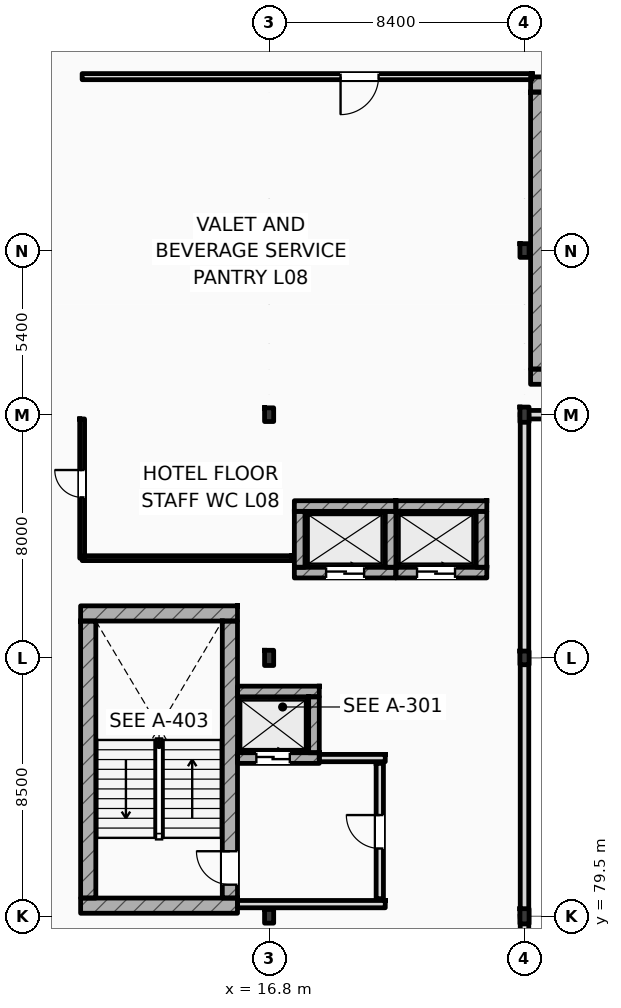
"""IFC4 building model, lengths in metres.
Left out: names, types, materials, properties, quantities, classifications, styles, units other than length and angle.
Written with IfcOpenShell. Run it as: python <this file> out.ifc"""

import sys

from ifc_helpers import new_model, si_unit, direction, frame, frame_2d, origin, origin_2d, place, context, subcontext, project, spatial, rectangle, i_section, extrude, element, fill, save


model = new_model("IFC4")
c1 = context("Model", 3, precision=1e-05, world=origin(), true_north=direction((0.0, 1.0)))
c2 = subcontext(c1, "Body", "Model", "MODEL_VIEW")
j1 = project(units=[si_unit("LENGTHUNIT", "METRE"), si_unit("PLANEANGLEUNIT", "RADIAN")], contexts=[c1])
p1 = place(None, origin())
s1 = spatial("IfcSite", under=j1, at=p1, CompositionType="ELEMENT")
p2 = place(p1, origin())
s2 = spatial("IfcBuilding", under=s1, at=p2, CompositionType="ELEMENT")
p3 = place(p2, frame((0.0, 0.0, 35.4)))
s3 = spatial("IfcBuildingStorey", under=s2, at=p3, CompositionType="ELEMENT", Elevation=35.4)
p4 = place(p3, frame((16.8, 79.5, 0.0), z_axis=(0.0, 0.0, 1.0), x_axis=(1.0, 0.0, 0.0)))
e1 = element("IfcColumn", 1, at=p4, inside=s3, PredefinedType="COLUMN", context=c2, shape_type="SweptSolid", body=[
    extrude(i_section(OverallWidth=0.3, OverallDepth=0.45, WebThickness=0.014, FlangeThickness=0.026, FilletRadius=0.027, at=origin_2d()), origin(), (0.0, 0.0, 1.0), 3.6),
])
p5 = place(p3, frame((16.8, 88.0, 0.0), z_axis=(0.0, 0.0, 1.0), x_axis=(1.0, 0.0, 0.0)))
e2 = element("IfcColumn", 2, at=p5, inside=s3, PredefinedType="COLUMN", context=c2, shape_type="SweptSolid", body=[
    extrude(i_section(OverallWidth=0.3, OverallDepth=0.5, WebThickness=0.014, FlangeThickness=0.028, FilletRadius=0.027, at=origin_2d()), origin(), (0.0, 0.0, 1.0), 3.6),
])
p6 = place(p3, frame((16.8, 96.0, 0.0), z_axis=(0.0, 0.0, 1.0), x_axis=(1.0, 0.0, 0.0)))
e3 = element("IfcColumn", 3, at=p6, inside=s3, PredefinedType="COLUMN", context=c2, shape_type="SweptSolid", body=[
    extrude(i_section(OverallWidth=0.3, OverallDepth=0.45, WebThickness=0.014, FlangeThickness=0.026, FilletRadius=0.027, at=origin_2d()), origin(), (0.0, 0.0, 1.0), 3.6),
])
p7 = place(p3, frame((25.2, 79.5, 0.0), z_axis=(0.0, 0.0, 1.0), x_axis=(1.0, 0.0, 0.0)))
e4 = element("IfcColumn", 4, at=p7, inside=s3, PredefinedType="COLUMN", context=c2, shape_type="SweptSolid", body=[
    extrude(i_section(OverallWidth=0.3, OverallDepth=0.5, WebThickness=0.014, FlangeThickness=0.028, FilletRadius=0.027, at=origin_2d()), origin(), (0.0, 0.0, 1.0), 3.6),
])
p8 = place(p3, frame((25.2, 88.0, 0.0), z_axis=(0.0, 0.0, 1.0), x_axis=(1.0, 0.0, 0.0)))
e5 = element("IfcColumn", 5, at=p8, inside=s3, PredefinedType="COLUMN", context=c2, shape_type="SweptSolid", body=[
    extrude(i_section(OverallWidth=0.3, OverallDepth=0.45, WebThickness=0.014, FlangeThickness=0.026, FilletRadius=0.027, at=origin_2d()), origin(), (0.0, 0.0, 1.0), 3.6),
])
p9 = place(p3, frame((25.2, 96.0, 0.0), z_axis=(0.0, 0.0, 1.0), x_axis=(1.0, 0.0, 0.0)))
e6 = element("IfcColumn", 6, at=p9, inside=s3, PredefinedType="COLUMN", context=c2, shape_type="SweptSolid", body=[
    extrude(i_section(OverallWidth=0.3, OverallDepth=0.5, WebThickness=0.014, FlangeThickness=0.028, FilletRadius=0.027, at=origin_2d()), origin(), (0.0, 0.0, 1.0), 3.6),
])
for number, where, z_axis, x_axis in (
    (7, (16.8, 101.4, 0.0), (0.0, 0.0, 1.0), (1.0, 0.0, 0.0)),
    (8, (25.2, 101.4, 0.0), (0.0, 0.0, 1.0), (1.0, 0.0, 0.0)),
):
    element("IfcColumn", number, at=place(p3, frame(where, z_axis=z_axis, x_axis=x_axis)), inside=s3, PredefinedType="COLUMN", context=c2, shape_type="SweptSolid", body=[
        extrude(i_section(OverallWidth=0.3, OverallDepth=0.45, WebThickness=0.014, FlangeThickness=0.026, FilletRadius=0.027, at=origin_2d()), origin(), (0.0, 0.0, 1.0), 3.6),
    ])
for number, where, z_axis, x_axis in (
    (9, (10.6, 89.462, 0.0), (0.0, 0.0, 1.0), (1.0, 0.0, 0.0)),
    (10, (10.6, 79.85, 0.0), (0.0, 0.0, 1.0), (1.0, 0.0, 0.0)),
):
    element("IfcWall", number, at=place(p3, frame(where, z_axis=z_axis, x_axis=x_axis)), inside=s3, PredefinedType="SHEAR", context=c2, shape_type="SweptSolid", body=[
        extrude(rectangle(XDim=5.16, YDim=0.5, at=frame_2d((2.58, 0.0))), origin(), (0.0, 0.0, 1.0), 3.6),
    ])
p10 = place(p3, frame((10.85, 80.1, 0.0), z_axis=(0.0, 0.0, 1.0), x_axis=(0.0, 1.0, 0.0)))
e11 = element("IfcWall", 11, at=p10, inside=s3, PredefinedType="SHEAR", context=c2, shape_type="SweptSolid", body=[
    extrude(rectangle(XDim=9.112, YDim=0.5, at=frame_2d((4.556, 0.0))), origin(), (0.0, 0.0, 1.0), 3.6),
])
p11 = place(p3, frame((15.51, 80.1, 0.0), z_axis=(0.0, 0.0, 1.0), x_axis=(0.0, 1.0, 0.0)))
e12 = element("IfcWall", 12, at=p11, inside=s3, PredefinedType="SHEAR", context=c2, shape_type="SweptSolid", body=[
    extrude(rectangle(XDim=9.112, YDim=0.5, at=frame_2d((4.556, 0.0))), origin(), (0.0, 0.0, 1.0), 3.6),
])
p12 = place(p11, frame((0.44, 0.0, 0.0)))
e13 = element("IfcOpeningElement", 13, at=p12, cuts=e12, PredefinedType="OPENING", context=c2, shape_type="SweptSolid", body=[
    extrude(rectangle(XDim=1.1, YDim=2.2, at=frame_2d((0.55, 1.1))), frame((0.0, 0.26, 0.0), z_axis=(0.0, -1.0, 0.0), x_axis=(1.0, 0.0, 0.0)), (0.0, 0.0, 1.0), 0.52),
])
for number, where, z_axis, x_axis in (
    (14, (25.4, 106.862, 0.0), (0.0, 0.0, 1.0), (1.0, 0.0, 0.0)),
    (15, (25.4, 97.25, 0.0), (0.0, 0.0, 1.0), (1.0, 0.0, 0.0)),
):
    element("IfcWall", number, at=place(p3, frame(where, z_axis=z_axis, x_axis=x_axis)), inside=s3, PredefinedType="SHEAR", context=c2, shape_type="SweptSolid", body=[
        extrude(rectangle(XDim=5.16, YDim=0.5, at=frame_2d((2.58, 0.0))), origin(), (0.0, 0.0, 1.0), 3.6),
    ])
p13 = place(p3, frame((25.65, 97.5, 0.0), z_axis=(0.0, 0.0, 1.0), x_axis=(0.0, 1.0, 0.0)))
e16 = element("IfcWall", 16, at=p13, inside=s3, PredefinedType="SHEAR", context=c2, shape_type="SweptSolid", body=[
    extrude(rectangle(XDim=9.112, YDim=0.5, at=frame_2d((4.556, 0.0))), origin(), (0.0, 0.0, 1.0), 3.6),
])
p14 = place(p3, frame((25.2, 96.0, 0.0), z_axis=(0.0, 0.0, 1.0), x_axis=(1.0, 0.0, 0.0)))
e17 = element("IfcWall", 17, at=p14, inside=s3, PredefinedType="STANDARD", context=c2, shape_type="SweptSolid", body=[
    extrude(rectangle(XDim=70.2, YDim=0.28, at=frame_2d((35.1, 0.0))), origin(), (0.0, 0.0, 1.0), 2.92),
])
p15 = place(p14, frame((16.694, 0.0, 0.9)))
e18 = element("IfcOpeningElement", 18, at=p15, cuts=e17, PredefinedType="OPENING", context=c2, shape_type="SweptSolid", body=[
    extrude(rectangle(XDim=1.8, YDim=1.84, at=frame_2d((0.9, 0.92))), frame((0.0, 0.15, 0.0), z_axis=(0.0, -1.0, 0.0), x_axis=(1.0, 0.0, 0.0)), (0.0, 0.0, 1.0), 0.3),
])
p16 = place(p14, frame((20.482, 0.0, 0.9)))
e19 = element("IfcOpeningElement", 19, at=p16, cuts=e17, PredefinedType="OPENING", context=c2, shape_type="SweptSolid", body=[
    extrude(rectangle(XDim=1.95, YDim=1.84, at=frame_2d((0.975, 0.92))), frame((0.0, 0.15, 0.0), z_axis=(0.0, -1.0, 0.0), x_axis=(1.0, 0.0, 0.0)), (0.0, 0.0, 1.0), 0.3),
])
p17 = place(p14, frame((24.316, 0.0, 0.9)))
e20 = element("IfcOpeningElement", 20, at=p17, cuts=e17, PredefinedType="OPENING", context=c2, shape_type="SweptSolid", body=[
    extrude(rectangle(XDim=2.1, YDim=1.84, at=frame_2d((1.05, 0.92))), frame((0.0, 0.15, 0.0), z_axis=(0.0, -1.0, 0.0), x_axis=(1.0, 0.0, 0.0)), (0.0, 0.0, 1.0), 0.3),
])
p18 = place(p14, frame((28.149, 0.0, 0.9)))
e21 = element("IfcOpeningElement", 21, at=p18, cuts=e17, PredefinedType="OPENING", context=c2, shape_type="SweptSolid", body=[
    extrude(rectangle(XDim=2.25, YDim=1.84, at=frame_2d((1.125, 0.92))), frame((0.0, 0.15, 0.0), z_axis=(0.0, -1.0, 0.0), x_axis=(1.0, 0.0, 0.0)), (0.0, 0.0, 1.0), 0.3),
])
p19 = place(p14, frame((31.983, 0.0, 0.9)))
e22 = element("IfcOpeningElement", 22, at=p19, cuts=e17, PredefinedType="OPENING", context=c2, shape_type="SweptSolid", body=[
    extrude(rectangle(XDim=2.4, YDim=1.84, at=frame_2d((1.2, 0.92))), frame((0.0, 0.15, 0.0), z_axis=(0.0, -1.0, 0.0), x_axis=(1.0, 0.0, 0.0)), (0.0, 0.0, 1.0), 0.3),
])
p20 = place(p14, frame((35.682, 0.0, 0.9)))
e23 = element("IfcOpeningElement", 23, at=p20, cuts=e17, PredefinedType="OPENING", context=c2, shape_type="SweptSolid", body=[
    extrude(rectangle(XDim=2.508, YDim=1.84, at=frame_2d((1.254, 0.92))), frame((0.0, 0.15, 0.0), z_axis=(0.0, -1.0, 0.0), x_axis=(1.0, 0.0, 0.0)), (0.0, 0.0, 1.0), 0.3),
])
p21 = place(p14, frame((55.56, 0.0, 0.9)))
e24 = element("IfcOpeningElement", 24, at=p21, cuts=e17, PredefinedType="OPENING", context=c2, shape_type="SweptSolid", body=[
    extrude(rectangle(XDim=1.8, YDim=1.84, at=frame_2d((0.9, 0.92))), frame((0.0, 0.15, 0.0), z_axis=(0.0, -1.0, 0.0), x_axis=(1.0, 0.0, 0.0)), (0.0, 0.0, 1.0), 0.3),
])
p22 = place(p14, frame((58.628, 0.0, 0.9)))
e25 = element("IfcOpeningElement", 25, at=p22, cuts=e17, PredefinedType="OPENING", context=c2, shape_type="SweptSolid", body=[
    extrude(rectangle(XDim=2.809, YDim=1.84, at=frame_2d((1.405, 0.92))), frame((0.0, 0.15, 0.0), z_axis=(0.0, -1.0, 0.0), x_axis=(1.0, 0.0, 0.0)), (0.0, 0.0, 1.0), 0.3),
])
p23 = place(p14, frame((63.257, 0.0, 0.9)))
e26 = element("IfcOpeningElement", 26, at=p23, cuts=e17, PredefinedType="OPENING", context=c2, shape_type="SweptSolid", body=[
    extrude(rectangle(XDim=1.8, YDim=1.84, at=frame_2d((0.9, 0.92))), frame((0.0, 0.15, 0.0), z_axis=(0.0, -1.0, 0.0), x_axis=(1.0, 0.0, 0.0)), (0.0, 0.0, 1.0), 0.3),
])
p24 = place(p14, frame((66.453, 0.0, 0.9)))
e27 = element("IfcOpeningElement", 27, at=p24, cuts=e17, PredefinedType="OPENING", context=c2, shape_type="SweptSolid", body=[
    extrude(rectangle(XDim=2.737, YDim=1.84, at=frame_2d((1.369, 0.92))), frame((0.0, 0.15, 0.0), z_axis=(0.0, -1.0, 0.0), x_axis=(1.0, 0.0, 0.0)), (0.0, 0.0, 1.0), 0.3),
])
p25 = place(p3, frame((25.2, 62.5, 0.0), z_axis=(0.0, 0.0, 1.0), x_axis=(0.0, 1.0, 0.0)))
e28 = element("IfcWall", 28, at=p25, inside=s3, PredefinedType="STANDARD", context=c2, shape_type="SweptSolid", body=[
    extrude(rectangle(XDim=17.0, YDim=0.28, at=frame_2d((8.5, 0.0))), origin(), (0.0, 0.0, 1.0), 3.01),
])
p26 = place(p3, frame((25.2, 79.5, 0.0), z_axis=(0.0, 0.0, 1.0), x_axis=(0.0, 1.0, 0.0)))
e29 = element("IfcWall", 29, at=p26, inside=s3, PredefinedType="STANDARD", context=c2, shape_type="SweptSolid", body=[
    extrude(rectangle(XDim=16.5, YDim=0.28, at=frame_2d((8.25, 0.0))), origin(), (0.0, 0.0, 1.0), 3.01),
])
p27 = place(p3, frame((15.76, 86.895, 0.0), z_axis=(0.0, 0.0, 1.0), x_axis=(1.0, 0.0, 0.0)))
e30 = element("IfcWall", 30, at=p27, inside=s3, PredefinedType="SHEAR", context=c2, shape_type="SweptSolid", body=[
    extrude(rectangle(XDim=2.69, YDim=0.35, at=frame_2d((1.345, 0.0))), origin(), (0.0, 0.0, 1.0), 3.38),
])
p28 = place(p3, frame((15.76, 84.705, 0.0), z_axis=(0.0, 0.0, 1.0), x_axis=(1.0, 0.0, 0.0)))
e31 = element("IfcWall", 31, at=p28, inside=s3, PredefinedType="SHEAR", context=c2, shape_type="SweptSolid", body=[
    extrude(rectangle(XDim=2.69, YDim=0.35, at=frame_2d((1.345, 0.0))), origin(), (0.0, 0.0, 1.0), 3.38),
])
p29 = place(p28, frame((0.62, 0.0, 0.0)))
e32 = element("IfcOpeningElement", 32, at=p29, cuts=e31, PredefinedType="OPENING", context=c2, shape_type="SweptSolid", body=[
    extrude(rectangle(XDim=1.1, YDim=2.2, at=frame_2d((0.55, 1.1))), frame((0.0, 0.185, 0.0), z_axis=(0.0, -1.0, 0.0), x_axis=(1.0, 0.0, 0.0)), (0.0, 0.0, 1.0), 0.37),
])
p30 = place(p3, frame((18.275, 84.88, 0.0), z_axis=(0.0, 0.0, 1.0), x_axis=(0.0, 1.0, 0.0)))
e33 = element("IfcWall", 33, at=p30, inside=s3, PredefinedType="SHEAR", context=c2, shape_type="SweptSolid", body=[
    extrude(rectangle(XDim=1.84, YDim=0.35, at=frame_2d((0.92, 0.0))), origin(), (0.0, 0.0, 1.0), 3.38),
])
p31 = place(p3, frame((17.63, 92.995, 0.0), z_axis=(0.0, 0.0, 1.0), x_axis=(1.0, 0.0, 0.0)))
e34 = element("IfcWall", 34, at=p31, inside=s3, PredefinedType="SHEAR", context=c2, shape_type="SweptSolid", body=[
    extrude(rectangle(XDim=3.34, YDim=0.35, at=frame_2d((1.67, 0.0))), origin(), (0.0, 0.0, 1.0), 3.38),
])
p32 = place(p3, frame((17.63, 90.805, 0.0), z_axis=(0.0, 0.0, 1.0), x_axis=(1.0, 0.0, 0.0)))
e35 = element("IfcWall", 35, at=p32, inside=s3, PredefinedType="SHEAR", context=c2, shape_type="SweptSolid", body=[
    extrude(rectangle(XDim=3.34, YDim=0.35, at=frame_2d((1.67, 0.0))), origin(), (0.0, 0.0, 1.0), 3.38),
])
p33 = place(p32, frame((1.045, 0.0, 0.0)))
e36 = element("IfcOpeningElement", 36, at=p33, cuts=e35, PredefinedType="OPENING", context=c2, shape_type="SweptSolid", body=[
    extrude(rectangle(XDim=1.25, YDim=2.25, at=frame_2d((0.625, 1.125))), frame((0.0, 0.185, 0.0), z_axis=(0.0, -1.0, 0.0), x_axis=(1.0, 0.0, 0.0)), (0.0, 0.0, 1.0), 0.37),
])
for number, where, z_axis, x_axis in (
    (37, (17.805, 90.98, 0.0), (0.0, 0.0, 1.0), (0.0, 1.0, 0.0)),
    (38, (20.795, 90.98, 0.0), (0.0, 0.0, 1.0), (0.0, 1.0, 0.0)),
):
    element("IfcWall", number, at=place(p3, frame(where, z_axis=z_axis, x_axis=x_axis)), inside=s3, PredefinedType="SHEAR", context=c2, shape_type="SweptSolid", body=[
        extrude(rectangle(XDim=1.84, YDim=0.35, at=frame_2d((0.92, 0.0))), origin(), (0.0, 0.0, 1.0), 3.38),
    ])
p34 = place(p3, frame((20.97, 92.995, 0.0), z_axis=(0.0, 0.0, 1.0), x_axis=(1.0, 0.0, 0.0)))
e39 = element("IfcWall", 39, at=p34, inside=s3, PredefinedType="SHEAR", context=c2, shape_type="SweptSolid", body=[
    extrude(rectangle(XDim=2.99, YDim=0.35, at=frame_2d((1.495, 0.0))), origin(), (0.0, 0.0, 1.0), 3.38),
])
p35 = place(p3, frame((20.97, 90.805, 0.0), z_axis=(0.0, 0.0, 1.0), x_axis=(1.0, 0.0, 0.0)))
e40 = element("IfcWall", 40, at=p35, inside=s3, PredefinedType="SHEAR", context=c2, shape_type="SweptSolid", body=[
    extrude(rectangle(XDim=2.99, YDim=0.35, at=frame_2d((1.495, 0.0))), origin(), (0.0, 0.0, 1.0), 3.38),
])
p36 = place(p35, frame((0.695, 0.0, 0.0)))
e41 = element("IfcOpeningElement", 41, at=p36, cuts=e40, PredefinedType="OPENING", context=c2, shape_type="SweptSolid", body=[
    extrude(rectangle(XDim=1.25, YDim=2.25, at=frame_2d((0.625, 1.125))), frame((0.0, 0.185, 0.0), z_axis=(0.0, -1.0, 0.0), x_axis=(1.0, 0.0, 0.0)), (0.0, 0.0, 1.0), 0.37),
])
p37 = place(p3, frame((23.785, 90.98, 0.0), z_axis=(0.0, 0.0, 1.0), x_axis=(0.0, 1.0, 0.0)))
e42 = element("IfcWall", 42, at=p37, inside=s3, PredefinedType="SHEAR", context=c2, shape_type="SweptSolid", body=[
    extrude(rectangle(XDim=1.84, YDim=0.35, at=frame_2d((0.92, 0.0))), origin(), (0.0, 0.0, 1.0), 3.38),
])
p38 = place(p3, frame((15.76, 79.9, 0.0), z_axis=(0.0, 0.0, 1.0), x_axis=(1.0, 0.0, 0.0)))
e43 = element("IfcWall", 43, at=p38, inside=s3, PredefinedType="STANDARD", context=c2, shape_type="SweptSolid", body=[
    extrude(rectangle(XDim=4.86, YDim=0.24, at=frame_2d((2.43, 0.0))), origin(), (0.0, 0.0, 1.0), 3.38),
])
p39 = place(p3, frame((18.45, 84.705, 0.0), z_axis=(0.0, 0.0, 1.0), x_axis=(1.0, 0.0, 0.0)))
e44 = element("IfcWall", 44, at=p39, inside=s3, PredefinedType="STANDARD", context=c2, shape_type="SweptSolid", body=[
    extrude(rectangle(XDim=2.17, YDim=0.24, at=frame_2d((1.085, 0.0))), origin(), (0.0, 0.0, 1.0), 3.38),
])
p40 = place(p3, frame((20.44, 80.08, 0.0), z_axis=(0.0, 0.0, 1.0), x_axis=(0.0, 1.0, 0.0)))
e45 = element("IfcWall", 45, at=p40, inside=s3, PredefinedType="STANDARD", context=c2, shape_type="SweptSolid", body=[
    extrude(rectangle(XDim=4.45, YDim=0.24, at=frame_2d((2.225, 0.0))), origin(), (0.0, 0.0, 1.0), 3.38),
])
p41 = place(p40, frame((1.65, 0.0, 0.0)))
e46 = element("IfcOpeningElement", 46, at=p41, cuts=e45, PredefinedType="OPENING", context=c2, shape_type="SweptSolid", body=[
    extrude(rectangle(XDim=1.1, YDim=2.2, at=frame_2d((0.55, 1.1))), frame((0.0, 0.13, 0.0), z_axis=(0.0, -1.0, 0.0), x_axis=(1.0, 0.0, 0.0)), (0.0, 0.0, 1.0), 0.26),
])
p42 = place(p3, frame((10.65, 107.12, 0.0), z_axis=(0.0, 0.0, 1.0), x_axis=(1.0, 0.0, 0.0)))
e47 = element("IfcWall", 47, at=p42, inside=s3, PredefinedType="PARTITIONING", context=c2, shape_type="SweptSolid", body=[
    extrude(rectangle(XDim=14.8, YDim=0.2, at=frame_2d((7.4, 0.0))), origin(), (0.0, 0.0, 1.0), 3.38),
])
p43 = place(p42, frame((8.5, 0.0, 0.0)))
e48 = element("IfcOpeningElement", 48, at=p43, cuts=e47, PredefinedType="OPENING", context=c2, shape_type="SweptSolid", body=[
    extrude(rectangle(XDim=1.25, YDim=2.15, at=frame_2d((0.625, 1.075))), frame((0.0, 0.11, 0.0), z_axis=(0.0, -1.0, 0.0), x_axis=(1.0, 0.0, 0.0)), (0.0, 0.0, 1.0), 0.22),
])
p44 = place(p3, frame((10.65, 91.28, 0.0), z_axis=(0.0, 0.0, 1.0), x_axis=(0.0, 1.0, 0.0)))
e49 = element("IfcWall", 49, at=p44, inside=s3, PredefinedType="PARTITIONING", context=c2, shape_type="SweptSolid", body=[
    extrude(rectangle(XDim=4.58, YDim=0.16, at=frame_2d((2.29, 0.0))), origin(), (0.0, 0.0, 1.0), 3.38),
])
p45 = place(p44, frame((2.0, 0.0, 0.0)))
e50 = element("IfcOpeningElement", 50, at=p45, cuts=e49, PredefinedType="OPENING", context=c2, shape_type="SweptSolid", body=[
    extrude(rectangle(XDim=0.9, YDim=2.1, at=frame_2d((0.45, 1.05))), frame((0.0, 0.09, 0.0), z_axis=(0.0, -1.0, 0.0), x_axis=(1.0, 0.0, 0.0)), (0.0, 0.0, 1.0), 0.18),
])
p46 = place(p3, frame((10.65, 91.28, 0.0), z_axis=(0.0, 0.0, 1.0), x_axis=(1.0, 0.0, 0.0)))
e51 = element("IfcWall", 51, at=p46, inside=s3, PredefinedType="PARTITIONING", context=c2, shape_type="SweptSolid", body=[
    extrude(rectangle(XDim=6.9, YDim=0.16, at=frame_2d((3.45, 0.0))), origin(), (0.0, 0.0, 1.0), 3.38),
])
p47 = place(p12, origin())
e52 = element("IfcDoor", 52, at=p47, inside=s3, OperationType="SINGLE_SWING_RIGHT", PredefinedType="DOOR", context=c2, shape_type="SweptSolid", body=[
    extrude(rectangle(XDim=1.1, YDim=2.2, at=frame_2d((0.55, 1.1))), frame((0.0, 0.025, 0.0), z_axis=(0.0, -1.0, 0.0), x_axis=(1.0, 0.0, 0.0)), (0.0, 0.0, 1.0), 0.05),
])
fill(e13, e52)
p48 = place(p29, origin())
e53 = element("IfcDoor", 53, at=p48, inside=s3, OperationType="SLIDING_TO_LEFT", PredefinedType="DOOR", context=c2, shape_type="SweptSolid", body=[
    extrude(rectangle(XDim=1.1, YDim=2.2, at=frame_2d((0.55, 1.1))), frame((0.0, 0.025, 0.0), z_axis=(0.0, -1.0, 0.0), x_axis=(1.0, 0.0, 0.0)), (0.0, 0.0, 1.0), 0.05),
])
fill(e32, e53)
p49 = place(p33, origin())
e54 = element("IfcDoor", 54, at=p49, inside=s3, OperationType="SLIDING_TO_LEFT", PredefinedType="DOOR", context=c2, shape_type="SweptSolid", body=[
    extrude(rectangle(XDim=1.25, YDim=2.25, at=frame_2d((0.625, 1.125))), frame((0.0, 0.025, 0.0), z_axis=(0.0, -1.0, 0.0), x_axis=(1.0, 0.0, 0.0)), (0.0, 0.0, 1.0), 0.05),
])
fill(e36, e54)
p50 = place(p36, origin())
e55 = element("IfcDoor", 55, at=p50, inside=s3, OperationType="SLIDING_TO_LEFT", PredefinedType="DOOR", context=c2, shape_type="SweptSolid", body=[
    extrude(rectangle(XDim=1.25, YDim=2.25, at=frame_2d((0.625, 1.125))), frame((0.0, 0.025, 0.0), z_axis=(0.0, -1.0, 0.0), x_axis=(1.0, 0.0, 0.0)), (0.0, 0.0, 1.0), 0.05),
])
fill(e41, e55)
p51 = place(p41, origin())
e56 = element("IfcDoor", 56, at=p51, inside=s3, OperationType="SINGLE_SWING_RIGHT", PredefinedType="DOOR", context=c2, shape_type="SweptSolid", body=[
    extrude(rectangle(XDim=1.1, YDim=2.2, at=frame_2d((0.55, 1.1))), frame((0.0, 0.025, 0.0), z_axis=(0.0, -1.0, 0.0), x_axis=(1.0, 0.0, 0.0)), (0.0, 0.0, 1.0), 0.05),
])
fill(e46, e56)
p52 = place(p45, origin())
e57 = element("IfcDoor", 57, at=p52, inside=s3, OperationType="SINGLE_SWING_RIGHT", PredefinedType="DOOR", context=c2, shape_type="SweptSolid", body=[
    extrude(rectangle(XDim=0.9, YDim=2.1, at=frame_2d((0.45, 1.05))), frame((0.0, 0.025, 0.0), z_axis=(0.0, -1.0, 0.0), x_axis=(1.0, 0.0, 0.0)), (0.0, 0.0, 1.0), 0.05),
])
fill(e50, e57)
p53 = place(p43, frame((1.25, 0.0, 0.0), z_axis=(0.0, 0.0, 1.0), x_axis=(-1.0, 0.0, 0.0)))
e58 = element("IfcDoor", 58, at=p53, inside=s3, OperationType="SINGLE_SWING_LEFT", PredefinedType="DOOR", context=c2, shape_type="SweptSolid", body=[
    extrude(rectangle(XDim=1.25, YDim=2.15, at=frame_2d((0.625, 1.075))), frame((0.0, 0.025, 0.0), z_axis=(0.0, -1.0, 0.0), x_axis=(1.0, 0.0, 0.0)), (0.0, 0.0, 1.0), 0.05),
])
fill(e48, e58)
save(model, sys.argv[1])
